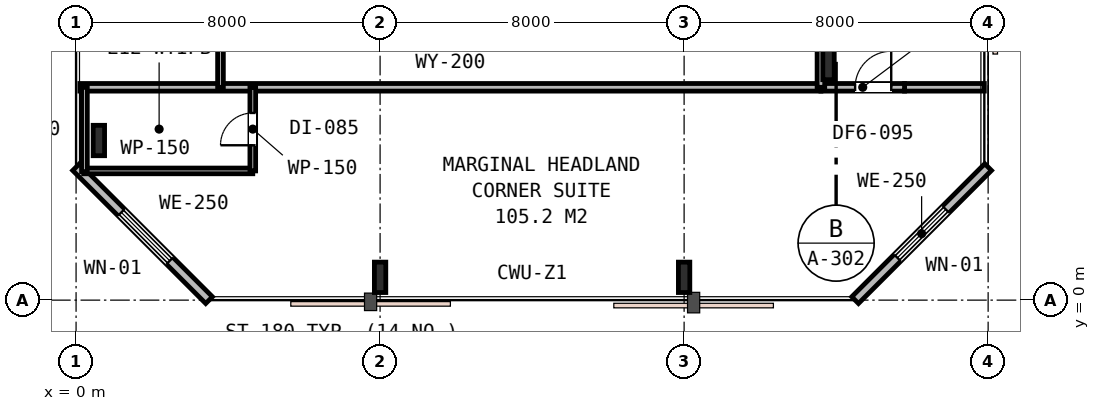
"""IFC4 building model, lengths in metres.
Left out: names, types, materials, properties, quantities, classifications, styles, units other than length and angle.
Written with IfcOpenShell. Run it as: python <this file> out.ifc"""

import sys

from ifc_helpers import new_model, si_unit, direction, frame, frame_2d, origin, origin_2d, place, context, subcontext, project, spatial, rectangle, i_section, extrude, element, fill, save


model = new_model("IFC4")
c1 = context("Model", 3, precision=1e-05, world=origin(), true_north=direction((0.0, 1.0)))
c2 = subcontext(c1, "Body", "Model", "MODEL_VIEW")
j1 = project(units=[si_unit("LENGTHUNIT", "METRE"), si_unit("PLANEANGLEUNIT", "RADIAN")], contexts=[c1])
p1 = place(None, origin())
s1 = spatial("IfcSite", under=j1, at=p1, CompositionType="ELEMENT")
p2 = place(p1, origin())
s2 = spatial("IfcBuilding", under=s1, at=p2, CompositionType="ELEMENT")
p3 = place(p2, frame((0.0, 0.0, 51.0)))
s3 = spatial("IfcBuildingStorey", under=s2, at=p3, CompositionType="ELEMENT", Elevation=51.0)
for number, where, z_axis, x_axis in (
    (1, (0.6, 4.2, 0.0), (0.0, 0.0, 1.0), (1.0, 0.0, 0.0)),
    (2, (8.0, 0.6, 0.0), (0.0, 0.0, 1.0), (1.0, 0.0, 0.0)),
    (3, (16.0, 0.6, 0.0), (0.0, 0.0, 1.0), (1.0, 0.0, 0.0)),
    (4, (19.8, 6.2, 0.0), (0.0, 0.0, 1.0), (1.0, 0.0, 0.0)),
):
    element("IfcColumn", number, at=place(p3, frame(where, z_axis=z_axis, x_axis=x_axis)), inside=s3, PredefinedType="COLUMN", context=c2, shape_type="SweptSolid", body=[
        extrude(i_section(OverallWidth=0.3, OverallDepth=0.8, WebThickness=0.018, FlangeThickness=0.033, FilletRadius=0.03, at=origin_2d()), origin(), (0.0, 0.0, 1.0), 3.6),
    ])
p4 = place(p3, frame((20.5, 0.0, 0.0), z_axis=(0.0, 0.0, 1.0), x_axis=(0.707106781187, 0.707106781187, 0.0)))
e5 = element("IfcWall", 5, at=p4, inside=s3, PredefinedType="STANDARD", context=c2, shape_type="SweptSolid", body=[
    extrude(rectangle(XDim=4.95, YDim=0.25, at=frame_2d((2.475, 0.0))), origin(), (0.0, 0.0, 1.0), 3.33),
])
p5 = place(p4, frame((1.575, 0.0, 0.75)))
e6 = element("IfcOpeningElement", 6, at=p5, cuts=e5, PredefinedType="OPENING", context=c2, shape_type="SweptSolid", body=[
    extrude(rectangle(XDim=1.8, YDim=1.85, at=frame_2d((0.9, 0.925))), frame((0.0, 0.135, 0.0), z_axis=(0.0, -1.0, 0.0), x_axis=(1.0, 0.0, 0.0)), (0.0, 0.0, 1.0), 0.27),
])
p6 = place(p3, frame((0.0, 3.5, 0.0), z_axis=(0.0, 0.0, 1.0), x_axis=(0.707106781187, -0.707106781187, 0.0)))
e7 = element("IfcWall", 7, at=p6, inside=s3, PredefinedType="STANDARD", context=c2, shape_type="SweptSolid", body=[
    extrude(rectangle(XDim=4.95, YDim=0.25, at=frame_2d((2.475, 0.0))), origin(), (0.0, 0.0, 1.0), 3.33),
])
p7 = place(p6, frame((1.685, 0.0, 0.75)))
e8 = element("IfcOpeningElement", 8, at=p7, cuts=e7, PredefinedType="OPENING", context=c2, shape_type="SweptSolid", body=[
    extrude(rectangle(XDim=1.8, YDim=1.85, at=frame_2d((0.9, 0.925))), frame((0.0, 0.135, 0.0), z_axis=(0.0, -1.0, 0.0), x_axis=(1.0, 0.0, 0.0)), (0.0, 0.0, 1.0), 0.27),
])
p8 = place(p3, frame((0.1, 5.6, 0.0), z_axis=(0.0, 0.0, 1.0), x_axis=(1.0, 0.0, 0.0)))
e9 = element("IfcWall", 9, at=p8, inside=s3, PredefinedType="PARTITIONING", context=c2, shape_type="SweptSolid", body=[
    extrude(rectangle(XDim=19.5, YDim=0.2, at=frame_2d((9.75, 0.0))), origin(), (0.0, 0.0, 1.0), 2.82),
])
p9 = place(p3, frame((21.8, 5.6, 0.0), z_axis=(0.0, 0.0, 1.0), x_axis=(1.0, 0.0, 0.0)))
e10 = element("IfcWall", 10, at=p9, inside=s3, PredefinedType="PARTITIONING", context=c2, shape_type="SweptSolid", body=[
    extrude(rectangle(XDim=2.1, YDim=0.2, at=frame_2d((1.05, 0.0))), origin(), (0.0, 0.0, 1.0), 3.33),
])
p10 = place(p3, frame((19.6, 5.6, 0.0), z_axis=(0.0, 0.0, 1.0), x_axis=(1.0, 0.0, 0.0)))
e11 = element("IfcWall", 11, at=p10, inside=s3, PredefinedType="PARTITIONING", context=c2, shape_type="SweptSolid", body=[
    extrude(rectangle(XDim=2.2, YDim=0.2, at=frame_2d((1.1, 0.0))), origin(), (0.0, 0.0, 1.0), 3.33),
])
p11 = place(p10, frame((0.9, 0.0, 0.0)))
e12 = element("IfcOpeningElement", 12, at=p11, cuts=e11, PredefinedType="OPENING", context=c2, shape_type="SweptSolid", body=[
    extrude(rectangle(XDim=0.95, YDim=2.15, at=frame_2d((0.475, 1.075))), frame((0.0, 0.11, 0.0), z_axis=(0.0, -1.0, 0.0), x_axis=(1.0, 0.0, 0.0)), (0.0, 0.0, 1.0), 0.22),
])
p12 = place(p3, frame((0.2, 3.4, 0.0), z_axis=(0.0, 0.0, 1.0), x_axis=(1.0, 0.0, 0.0)))
e13 = element("IfcWall", 13, at=p12, inside=s3, PredefinedType="PARTITIONING", context=c2, shape_type="SweptSolid", body=[
    extrude(rectangle(XDim=4.45, YDim=0.15, at=frame_2d((2.225, 0.0))), origin(), (0.0, 0.0, 1.0), 3.33),
])
p13 = place(p3, frame((4.65, 3.4, 0.0), z_axis=(0.0, 0.0, 1.0), x_axis=(0.0, 1.0, 0.0)))
e14 = element("IfcWall", 14, at=p13, inside=s3, PredefinedType="PARTITIONING", context=c2, shape_type="SweptSolid", body=[
    extrude(rectangle(XDim=2.2, YDim=0.15, at=frame_2d((1.1, 0.0))), origin(), (0.0, 0.0, 1.0), 3.33),
])
p14 = place(p13, frame((0.675, 0.0, 0.0)))
e15 = element("IfcOpeningElement", 15, at=p14, cuts=e14, PredefinedType="OPENING", context=c2, shape_type="SweptSolid", body=[
    extrude(rectangle(XDim=0.85, YDim=2.15, at=frame_2d((0.425, 1.075))), frame((0.0, 0.085, 0.0), z_axis=(0.0, -1.0, 0.0), x_axis=(1.0, 0.0, 0.0)), (0.0, 0.0, 1.0), 0.17),
])
p15 = place(p3, frame((0.22, 3.38, 0.0), z_axis=(0.0, 0.0, 1.0), x_axis=(0.0, 1.0, 0.0)))
e16 = element("IfcWall", 16, at=p15, inside=s3, PredefinedType="PARTITIONING", context=c2, shape_type="SweptSolid", body=[
    extrude(rectangle(XDim=2.22, YDim=0.15, at=frame_2d((1.11, 0.0))), origin(), (0.0, 0.0, 1.0), 2.93),
])
p16 = place(p3, frame((19.6, 5.6, 0.0), z_axis=(0.0, 0.0, 1.0), x_axis=(0.0, 1.0, 0.0)))
e17 = element("IfcWall", 17, at=p16, inside=s3, PredefinedType="PARTITIONING", context=c2, shape_type="SweptSolid", body=[
    extrude(rectangle(XDim=23.0, YDim=0.2, at=frame_2d((11.5, 0.0))), origin(), (0.0, 0.0, 1.0), 2.82),
])
p17 = place(p16, frame((2.19, 0.0, 0.0)))
e18 = element("IfcOpeningElement", 18, at=p17, cuts=e17, PredefinedType="OPENING", context=c2, shape_type="SweptSolid", body=[
    extrude(rectangle(XDim=0.95, YDim=2.15, at=frame_2d((0.475, 1.075))), frame((0.0, 0.11, 0.0), z_axis=(0.0, -1.0, 0.0), x_axis=(1.0, 0.0, 0.0)), (0.0, 0.0, 1.0), 0.22),
])
p18 = place(p16, frame((9.92, 0.0, 0.0)))
e19 = element("IfcOpeningElement", 19, at=p18, cuts=e17, PredefinedType="OPENING", context=c2, shape_type="SweptSolid", body=[
    extrude(rectangle(XDim=0.95, YDim=2.15, at=frame_2d((0.475, 1.075))), frame((0.0, 0.11, 0.0), z_axis=(0.0, -1.0, 0.0), x_axis=(1.0, 0.0, 0.0)), (0.0, 0.0, 1.0), 0.22),
])
p19 = place(p16, frame((17.41, 0.0, 0.0)))
e20 = element("IfcOpeningElement", 20, at=p19, cuts=e17, PredefinedType="OPENING", context=c2, shape_type="SweptSolid", body=[
    extrude(rectangle(XDim=0.95, YDim=2.15, at=frame_2d((0.475, 1.075))), frame((0.0, 0.11, 0.0), z_axis=(0.0, -1.0, 0.0), x_axis=(1.0, 0.0, 0.0)), (0.0, 0.0, 1.0), 0.22),
])
p20 = place(p3, frame((3.8, 5.6, 0.0), z_axis=(0.0, 0.0, 1.0), x_axis=(0.0, 1.0, 0.0)))
e21 = element("IfcWall", 21, at=p20, inside=s3, PredefinedType="PARTITIONING", context=c2, shape_type="SweptSolid", body=[
    extrude(rectangle(XDim=23.0, YDim=0.15, at=frame_2d((11.5, 0.0))), origin(), (0.0, 0.0, 1.0), 2.82),
])
p21 = place(p20, frame((2.575, 0.0, 0.0)))
e22 = element("IfcOpeningElement", 22, at=p21, cuts=e21, PredefinedType="OPENING", context=c2, shape_type="SweptSolid", body=[
    extrude(rectangle(XDim=0.9, YDim=2.15, at=frame_2d((0.45, 1.075))), frame((0.0, 0.085, 0.0), z_axis=(0.0, -1.0, 0.0), x_axis=(1.0, 0.0, 0.0)), (0.0, 0.0, 1.0), 0.17),
])
p22 = place(p20, frame((10.365, 0.0, 0.0)))
e23 = element("IfcOpeningElement", 23, at=p22, cuts=e21, PredefinedType="OPENING", context=c2, shape_type="SweptSolid", body=[
    extrude(rectangle(XDim=0.9, YDim=2.15, at=frame_2d((0.45, 1.075))), frame((0.0, 0.085, 0.0), z_axis=(0.0, -1.0, 0.0), x_axis=(1.0, 0.0, 0.0)), (0.0, 0.0, 1.0), 0.17),
])
p23 = place(p20, frame((16.26, 0.0, 0.0)))
e24 = element("IfcOpeningElement", 24, at=p23, cuts=e21, PredefinedType="OPENING", context=c2, shape_type="SweptSolid", body=[
    extrude(rectangle(XDim=0.9, YDim=2.15, at=frame_2d((0.45, 1.075))), frame((0.0, 0.085, 0.0), z_axis=(0.0, -1.0, 0.0), x_axis=(1.0, 0.0, 0.0)), (0.0, 0.0, 1.0), 0.17),
])
p24 = place(p5, origin())
e25 = element("IfcWindow", 25, at=p24, inside=s3, PartitioningType="SINGLE_PANEL", PredefinedType="WINDOW", context=c2, shape_type="SweptSolid", body=[
    extrude(rectangle(XDim=1.8, YDim=1.85, at=frame_2d((0.9, 0.925))), frame((0.0, 0.03, 0.0), z_axis=(0.0, -1.0, 0.0), x_axis=(1.0, 0.0, 0.0)), (0.0, 0.0, 1.0), 0.06),
])
fill(e6, e25)
p25 = place(p7, origin())
e26 = element("IfcWindow", 26, at=p25, inside=s3, PartitioningType="SINGLE_PANEL", PredefinedType="WINDOW", context=c2, shape_type="SweptSolid", body=[
    extrude(rectangle(XDim=1.8, YDim=1.85, at=frame_2d((0.9, 0.925))), frame((0.0, 0.03, 0.0), z_axis=(0.0, -1.0, 0.0), x_axis=(1.0, 0.0, 0.0)), (0.0, 0.0, 1.0), 0.06),
])
fill(e8, e26)
p26 = place(p11, origin())
e27 = element("IfcDoor", 27, at=p26, inside=s3, OperationType="SINGLE_SWING_RIGHT", PredefinedType="DOOR", context=c2, shape_type="SweptSolid", body=[
    extrude(rectangle(XDim=0.95, YDim=2.15, at=frame_2d((0.475, 1.075))), frame((0.0, 0.025, 0.0), z_axis=(0.0, -1.0, 0.0), x_axis=(1.0, 0.0, 0.0)), (0.0, 0.0, 1.0), 0.05),
])
fill(e12, e27)
p27 = place(p14, origin())
e28 = element("IfcDoor", 28, at=p27, inside=s3, OperationType="SINGLE_SWING_LEFT", PredefinedType="DOOR", context=c2, shape_type="SweptSolid", body=[
    extrude(rectangle(XDim=0.85, YDim=2.15, at=frame_2d((0.425, 1.075))), frame((0.0, 0.025, 0.0), z_axis=(0.0, -1.0, 0.0), x_axis=(1.0, 0.0, 0.0)), (0.0, 0.0, 1.0), 0.05),
])
fill(e15, e28)
save(model, sys.argv[1])
